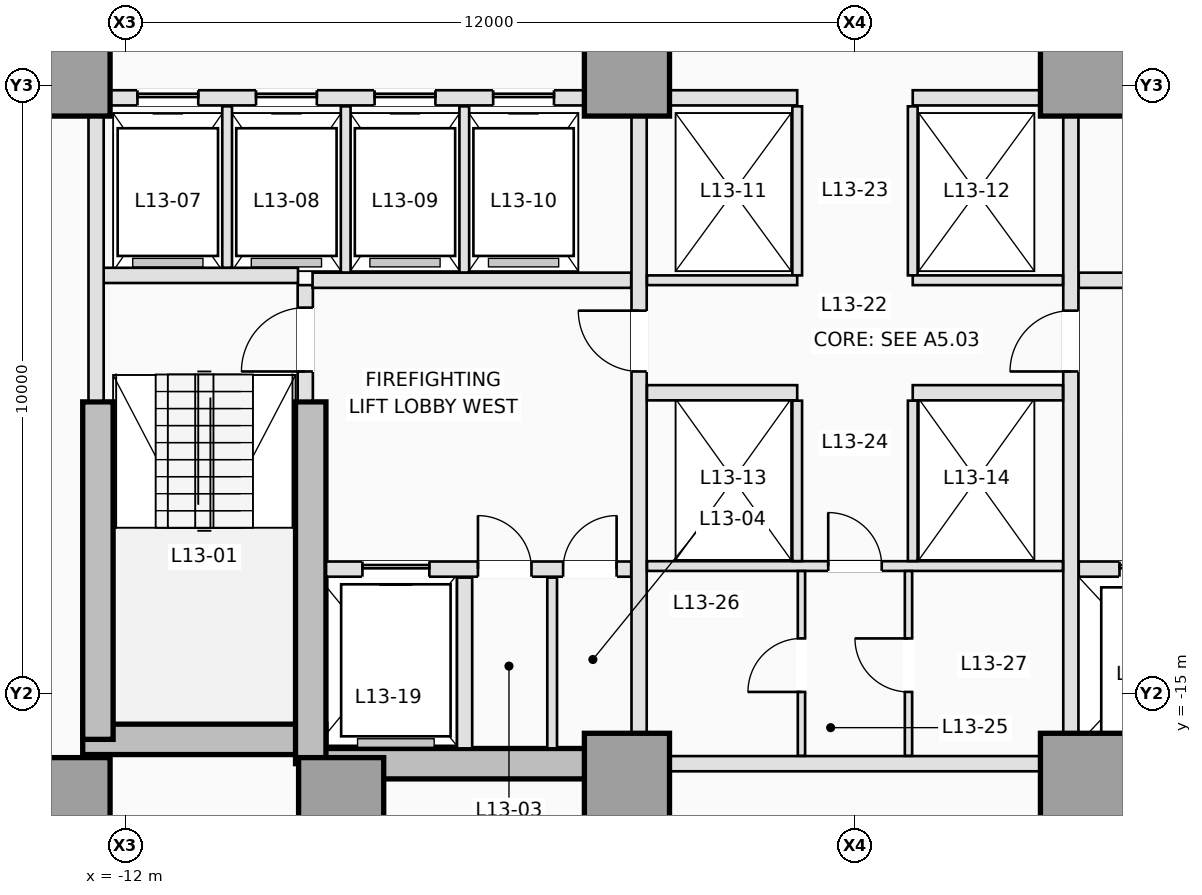
"""IFC4 building model, lengths in metres.
Left out: names, types, materials, properties, quantities, classifications, styles, units other than length and angle.
Written with IfcOpenShell. Run it as: python <this file> out.ifc"""

import sys

from ifc_helpers import new_model, si_unit, direction, frame, frame_2d, origin, origin_2d, place, context, subcontext, project, spatial, rectangle, extrude, element, fill, save


model = new_model("IFC4")
c1 = context("Model", 3, precision=1e-05, world=origin(), true_north=direction((0.0, 1.0)))
c2 = subcontext(c1, "Body", "Model", "MODEL_VIEW")
j1 = project(units=[si_unit("LENGTHUNIT", "METRE"), si_unit("PLANEANGLEUNIT", "RADIAN")], contexts=[c1])
p1 = place(None, origin())
s1 = spatial("IfcSite", under=j1, at=p1, CompositionType="ELEMENT")
p2 = place(p1, origin())
s2 = spatial("IfcBuilding", under=s1, at=p2, CompositionType="ELEMENT")
p3 = place(p2, frame((0.0, 0.0, 52.1)))
s3 = spatial("IfcBuildingStorey", under=s2, at=p3, CompositionType="ELEMENT", Elevation=52.1)
p4 = place(p3, frame((-12.7, -15.75, 0.0), z_axis=(0.0, 0.0, 1.0), x_axis=(1.0, 0.0, 0.0)))
e1 = element("IfcWall", 1, at=p4, inside=s3, PredefinedType="SHEAR", context=c2, shape_type="SweptSolid", body=[
    extrude(rectangle(XDim=4.0, YDim=0.5, at=frame_2d((2.0, 0.0))), origin(), (0.0, 0.0, 1.0), 3.5),
])
for number, where, z_axis, x_axis in (
    (2, (-8.95, -16.15, 0.0), (0.0, 0.0, 1.0), (1.0, 0.0, 0.0)),
    (3, (3.75, -16.15, 0.0), (0.0, 0.0, 1.0), (1.0, 0.0, 0.0)),
):
    element("IfcWall", number, at=place(p3, frame(where, z_axis=z_axis, x_axis=x_axis)), inside=s3, PredefinedType="SHEAR", context=c2, shape_type="SweptSolid", body=[
        extrude(rectangle(XDim=5.2, YDim=0.5, at=frame_2d((2.6, 0.0))), origin(), (0.0, 0.0, 1.0), 3.5),
    ])
p5 = place(p3, frame((-12.45, -15.75, 0.0), z_axis=(0.0, 0.0, 1.0), x_axis=(0.0, 1.0, 0.0)))
e4 = element("IfcWall", 4, at=p5, inside=s3, PredefinedType="SHEAR", context=c2, shape_type="SweptSolid", body=[
    extrude(rectangle(XDim=5.55, YDim=0.5, at=frame_2d((2.775, 0.0))), origin(), (0.0, 0.0, 1.0), 3.5),
])
p6 = place(p3, frame((-8.95, -16.15, 0.0), z_axis=(0.0, 0.0, 1.0), x_axis=(0.0, 1.0, 0.0)))
e5 = element("IfcWall", 5, at=p6, inside=s3, PredefinedType="SHEAR", context=c2, shape_type="SweptSolid", body=[
    extrude(rectangle(XDim=5.95, YDim=0.5, at=frame_2d((2.975, 0.0))), origin(), (0.0, 0.0, 1.0), 3.5),
])
for number, where, z_axis, x_axis in (
    (6, (-12.95, -16.75, 0.0), (0.0, 0.0, 1.0), (1.0, 0.0, 0.0)),
    (7, (-8.45, -16.75, 0.0), (0.0, 0.0, 1.0), (1.0, 0.0, 0.0)),
    (8, (-3.75, -16.35, 0.0), (0.0, 0.0, 1.0), (1.0, 0.0, 0.0)),
    (9, (3.75, -16.35, 0.0), (0.0, 0.0, 1.0), (1.0, 0.0, 0.0)),
    (10, (-12.95, -4.8, 0.0), (0.0, 0.0, 1.0), (1.0, 0.0, 0.0)),
    (11, (-3.75, -4.8, 0.0), (0.0, 0.0, 1.0), (1.0, 0.0, 0.0)),
    (12, (3.75, -4.8, 0.0), (0.0, 0.0, 1.0), (1.0, 0.0, 0.0)),
):
    element("IfcColumn", number, at=place(p3, frame(where, z_axis=z_axis, x_axis=x_axis)), inside=s3, PredefinedType="COLUMN", context=c2, shape_type="SweptSolid", body=[
        extrude(rectangle(XDim=1.4, YDim=1.4, at=origin_2d()), origin(), (0.0, 0.0, 1.0), 3.5),
    ])
p7 = place(p3, frame((-9.04, -10.18, 0.0), z_axis=(0.0, 0.0, 1.0), x_axis=(0.0, 1.0, 0.0)))
e13 = element("IfcWall", 13, at=p7, inside=s3, PredefinedType="PARTITIONING", context=c2, shape_type="SweptSolid", body=[
    extrude(rectangle(XDim=1.9, YDim=0.25, at=frame_2d((0.95, 0.0))), origin(), (0.0, 0.0, 1.0), 3.25),
])
p8 = place(p7, frame((0.48, 0.0, 0.0)))
e14 = element("IfcOpeningElement", 14, at=p8, cuts=e13, PredefinedType="OPENING", context=c2, shape_type="SweptSolid", body=[
    extrude(rectangle(XDim=1.05, YDim=2.15, at=frame_2d((0.525, 1.075))), frame((0.0, 0.135, 0.0), z_axis=(0.0, -1.0, 0.0), x_axis=(1.0, 0.0, 0.0)), (0.0, 0.0, 1.0), 0.27),
])
p9 = place(p3, frame((-12.38, -8.12, 0.0), z_axis=(0.0, 0.0, 1.0), x_axis=(1.0, 0.0, 0.0)))
e15 = element("IfcWall", 15, at=p9, inside=s3, PredefinedType="PARTITIONING", context=c2, shape_type="SweptSolid", body=[
    extrude(rectangle(XDim=3.22, YDim=0.25, at=frame_2d((1.61, 0.0))), origin(), (0.0, 0.0, 1.0), 3.25),
])
p10 = place(p3, frame((-12.48, -10.18, 0.0), z_axis=(0.0, 0.0, 1.0), x_axis=(0.0, 1.0, 0.0)))
e16 = element("IfcWall", 16, at=p10, inside=s3, PredefinedType="PARTITIONING", context=c2, shape_type="SweptSolid", body=[
    extrude(rectangle(XDim=4.678, YDim=0.25, at=frame_2d((2.339, 0.0))), origin(), (0.0, 0.0, 1.0), 3.25),
])
p11 = place(p3, frame((-8.698, -12.95, 0.0), z_axis=(0.0, 0.0, 1.0), x_axis=(1.0, 0.0, 0.0)))
e17 = element("IfcWall", 17, at=p11, inside=s3, PredefinedType="PARTITIONING", context=c2, shape_type="SweptSolid", body=[
    extrude(rectangle(XDim=5.018, YDim=0.25, at=frame_2d((2.509, 0.0))), origin(), (0.0, 0.0, 1.0), 3.25),
])
p12 = place(p11, frame((0.598, 0.0, 0.0)))
e18 = element("IfcOpeningElement", 18, at=p12, cuts=e17, PredefinedType="OPENING", context=c2, shape_type="SweptSolid", body=[
    extrude(rectangle(XDim=1.1, YDim=2.15, at=frame_2d((0.55, 1.075))), frame((0.0, 0.135, 0.0), z_axis=(0.0, -1.0, 0.0), x_axis=(1.0, 0.0, 0.0)), (0.0, 0.0, 1.0), 0.27),
])
p13 = place(p11, frame((2.498, 0.0, 0.0)))
e19 = element("IfcOpeningElement", 19, at=p13, cuts=e17, PredefinedType="OPENING", context=c2, shape_type="SweptSolid", body=[
    extrude(rectangle(XDim=0.88, YDim=2.1, at=frame_2d((0.44, 1.05))), frame((0.0, 0.135, 0.0), z_axis=(0.0, -1.0, 0.0), x_axis=(1.0, 0.0, 0.0)), (0.0, 0.0, 1.0), 0.27),
])
p14 = place(p11, frame((3.898, 0.0, 0.0)))
e20 = element("IfcOpeningElement", 20, at=p14, cuts=e17, PredefinedType="OPENING", context=c2, shape_type="SweptSolid", body=[
    extrude(rectangle(XDim=0.88, YDim=2.1, at=frame_2d((0.44, 1.05))), frame((0.0, 0.135, 0.0), z_axis=(0.0, -1.0, 0.0), x_axis=(1.0, 0.0, 0.0)), (0.0, 0.0, 1.0), 0.27),
])
p15 = place(p3, frame((3.68, -12.95, 0.0), z_axis=(0.0, 0.0, 1.0), x_axis=(1.0, 0.0, 0.0)))
e21 = element("IfcWall", 21, at=p15, inside=s3, PredefinedType="PARTITIONING", context=c2, shape_type="SweptSolid", body=[
    extrude(rectangle(XDim=5.018, YDim=0.25, at=frame_2d((2.509, 0.0))), origin(), (0.0, 0.0, 1.0), 3.25),
])
p16 = place(p15, frame((3.32, 0.0, 0.0)))
e22 = element("IfcOpeningElement", 22, at=p16, cuts=e21, PredefinedType="OPENING", context=c2, shape_type="SweptSolid", body=[
    extrude(rectangle(XDim=1.1, YDim=2.15, at=frame_2d((0.55, 1.075))), frame((0.0, 0.135, 0.0), z_axis=(0.0, -1.0, 0.0), x_axis=(1.0, 0.0, 0.0)), (0.0, 0.0, 1.0), 0.27),
])
p17 = place(p15, frame((0.67, 0.0, 0.0)))
e23 = element("IfcOpeningElement", 23, at=p17, cuts=e21, PredefinedType="OPENING", context=c2, shape_type="SweptSolid", body=[
    extrude(rectangle(XDim=1.2, YDim=2.15, at=frame_2d((0.6, 1.075))), frame((0.0, 0.135, 0.0), z_axis=(0.0, -1.0, 0.0), x_axis=(1.0, 0.0, 0.0)), (0.0, 0.0, 1.0), 0.27),
])
p18 = place(p3, frame((-6.42, -15.898, 0.0), z_axis=(0.0, 0.0, 1.0), x_axis=(0.0, 1.0, 0.0)))
e24 = element("IfcWall", 24, at=p18, inside=s3, PredefinedType="PARTITIONING", context=c2, shape_type="SweptSolid", body=[
    extrude(rectangle(XDim=2.808, YDim=0.25, at=frame_2d((1.404, 0.0))), origin(), (0.0, 0.0, 1.0), 3.25),
])
p19 = place(p3, frame((-4.98, -15.898, 0.0), z_axis=(0.0, 0.0, 1.0), x_axis=(0.0, 1.0, 0.0)))
e25 = element("IfcWall", 25, at=p19, inside=s3, PredefinedType="PARTITIONING", context=c2, shape_type="SweptSolid", body=[
    extrude(rectangle(XDim=2.808, YDim=0.16, at=frame_2d((1.404, 0.0))), origin(), (0.0, 0.0, 1.0), 3.25),
])
for number, where, z_axis, x_axis in (
    (26, (-8.92, -8.2, 0.0), (0.0, 0.0, 1.0), (1.0, 0.0, 0.0)),
    (27, (3.68, -8.2, 0.0), (0.0, 0.0, 1.0), (1.0, 0.0, 0.0)),
):
    element("IfcWall", number, at=place(p3, frame(where, z_axis=z_axis, x_axis=x_axis)), inside=s3, PredefinedType="PARTITIONING", context=c2, shape_type="SweptSolid", body=[
        extrude(rectangle(XDim=5.24, YDim=0.25, at=frame_2d((2.62, 0.0))), origin(), (0.0, 0.0, 1.0), 3.25),
    ])
p20 = place(p3, frame((-3.55, -15.648, 0.0), z_axis=(0.0, 0.0, 1.0), x_axis=(0.0, 1.0, 0.0)))
e28 = element("IfcWall", 28, at=p20, inside=s3, PredefinedType="PARTITIONING", context=c2, shape_type="SweptSolid", body=[
    extrude(rectangle(XDim=10.146, YDim=0.25, at=frame_2d((5.073, 0.0))), origin(), (0.0, 0.0, 1.0), 3.25),
])
p21 = place(p20, frame((5.948, 0.0, 0.0)))
e29 = element("IfcOpeningElement", 29, at=p21, cuts=e28, PredefinedType="OPENING", context=c2, shape_type="SweptSolid", body=[
    extrude(rectangle(XDim=1.0, YDim=2.15, at=frame_2d((0.5, 1.075))), frame((0.0, 0.135, 0.0), z_axis=(0.0, -1.0, 0.0), x_axis=(1.0, 0.0, 0.0)), (0.0, 0.0, 1.0), 0.27),
])
p22 = place(p3, frame((3.55, -15.648, 0.0), z_axis=(0.0, 0.0, 1.0), x_axis=(0.0, 1.0, 0.0)))
e30 = element("IfcWall", 30, at=p22, inside=s3, PredefinedType="PARTITIONING", context=c2, shape_type="SweptSolid", body=[
    extrude(rectangle(XDim=10.146, YDim=0.25, at=frame_2d((5.073, 0.0))), origin(), (0.0, 0.0, 1.0), 3.25),
])
p23 = place(p22, frame((5.948, 0.0, 0.0)))
e31 = element("IfcOpeningElement", 31, at=p23, cuts=e30, PredefinedType="OPENING", context=c2, shape_type="SweptSolid", body=[
    extrude(rectangle(XDim=1.0, YDim=2.15, at=frame_2d((0.5, 1.075))), frame((0.0, 0.135, 0.0), z_axis=(0.0, -1.0, 0.0), x_axis=(1.0, 0.0, 0.0)), (0.0, 0.0, 1.0), 0.27),
])
p24 = place(p3, frame((-12.248, -5.2, 0.0), z_axis=(0.0, 0.0, 1.0), x_axis=(1.0, 0.0, 0.0)))
e32 = element("IfcWall", 32, at=p24, inside=s3, PredefinedType="PARTITIONING", context=c2, shape_type="SweptSolid", body=[
    extrude(rectangle(XDim=7.796, YDim=0.25, at=frame_2d((3.898, 0.0))), origin(), (0.0, 0.0, 1.0), 3.25),
])
p25 = place(p24, frame((0.448, 0.0, 0.0)))
e33 = element("IfcOpeningElement", 33, at=p25, cuts=e32, PredefinedType="OPENING", context=c2, shape_type="SweptSolid", body=[
    extrude(rectangle(XDim=1.0, YDim=2.15, at=frame_2d((0.5, 1.075))), frame((0.0, 0.135, 0.0), z_axis=(0.0, -1.0, 0.0), x_axis=(1.0, 0.0, 0.0)), (0.0, 0.0, 1.0), 0.27),
])
p26 = place(p24, frame((2.398, 0.0, 0.0)))
e34 = element("IfcOpeningElement", 34, at=p26, cuts=e32, PredefinedType="OPENING", context=c2, shape_type="SweptSolid", body=[
    extrude(rectangle(XDim=1.0, YDim=2.15, at=frame_2d((0.5, 1.075))), frame((0.0, 0.135, 0.0), z_axis=(0.0, -1.0, 0.0), x_axis=(1.0, 0.0, 0.0)), (0.0, 0.0, 1.0), 0.27),
])
p27 = place(p24, frame((4.348, 0.0, 0.0)))
e35 = element("IfcOpeningElement", 35, at=p27, cuts=e32, PredefinedType="OPENING", context=c2, shape_type="SweptSolid", body=[
    extrude(rectangle(XDim=1.0, YDim=2.15, at=frame_2d((0.5, 1.075))), frame((0.0, 0.135, 0.0), z_axis=(0.0, -1.0, 0.0), x_axis=(1.0, 0.0, 0.0)), (0.0, 0.0, 1.0), 0.27),
])
p28 = place(p24, frame((6.298, 0.0, 0.0)))
e36 = element("IfcOpeningElement", 36, at=p28, cuts=e32, PredefinedType="OPENING", context=c2, shape_type="SweptSolid", body=[
    extrude(rectangle(XDim=1.0, YDim=2.15, at=frame_2d((0.5, 1.075))), frame((0.0, 0.135, 0.0), z_axis=(0.0, -1.0, 0.0), x_axis=(1.0, 0.0, 0.0)), (0.0, 0.0, 1.0), 0.27),
])
for number, where, z_axis, x_axis in (
    (37, (-3.048, -5.2, 0.0), (0.0, 0.0, 1.0), (1.0, 0.0, 0.0)),
    (38, (0.95, -5.2, 0.0), (0.0, 0.0, 1.0), (1.0, 0.0, 0.0)),
):
    element("IfcWall", number, at=place(p3, frame(where, z_axis=z_axis, x_axis=x_axis)), inside=s3, PredefinedType="PARTITIONING", context=c2, shape_type="SweptSolid", body=[
        extrude(rectangle(XDim=2.098, YDim=0.25, at=frame_2d((1.049, 0.0))), origin(), (0.0, 0.0, 1.0), 3.25),
    ])
p29 = place(p3, frame((-10.325, -7.993, 0.0), z_axis=(0.0, 0.0, 1.0), x_axis=(0.0, 1.0, 0.0)))
e39 = element("IfcWall", 39, at=p29, inside=s3, PredefinedType="PARTITIONING", context=c2, shape_type="SweptSolid", body=[
    extrude(rectangle(XDim=2.653, YDim=0.16, at=frame_2d((1.326, 0.0))), origin(), (0.0, 0.0, 1.0), 3.25),
])
for number, where, z_axis, x_axis in (
    (40, (-8.375, -8.073, 0.0), (0.0, 0.0, 1.0), (0.0, 1.0, 0.0)),
    (41, (-6.425, -8.073, 0.0), (0.0, 0.0, 1.0), (0.0, 1.0, 0.0)),
):
    element("IfcWall", number, at=place(p3, frame(where, z_axis=z_axis, x_axis=x_axis)), inside=s3, PredefinedType="PARTITIONING", context=c2, shape_type="SweptSolid", body=[
        extrude(rectangle(XDim=2.733, YDim=0.16, at=frame_2d((1.366, 0.0))), origin(), (0.0, 0.0, 1.0), 3.25),
    ])
p30 = place(p3, frame((-3.048, -16.15, 0.0), z_axis=(0.0, 0.0, 1.0), x_axis=(1.0, 0.0, 0.0)))
e42 = element("IfcWall", 42, at=p30, inside=s3, PredefinedType="PARTITIONING", context=c2, shape_type="SweptSolid", body=[
    extrude(rectangle(XDim=6.096, YDim=0.25, at=frame_2d((3.048, 0.0))), origin(), (0.0, 0.0, 1.0), 2.3),
])
for number, where, z_axis, x_axis in (
    (43, (-0.95, -8.12, 0.0), (0.0, 0.0, 1.0), (0.0, 1.0, 0.0)),
    (44, (0.95, -8.12, 0.0), (0.0, 0.0, 1.0), (0.0, 1.0, 0.0)),
):
    element("IfcWall", number, at=place(p3, frame(where, z_axis=z_axis, x_axis=x_axis)), inside=s3, PredefinedType="PARTITIONING", context=c2, shape_type="SweptSolid", body=[
        extrude(rectangle(XDim=2.78, YDim=0.16, at=frame_2d((1.39, 0.0))), origin(), (0.0, 0.0, 1.0), 3.25),
    ])
for number, where, z_axis, x_axis in (
    (45, (-3.42, -8.2, 0.0), (0.0, 0.0, 1.0), (1.0, 0.0, 0.0)),
    (46, (0.95, -8.2, 0.0), (0.0, 0.0, 1.0), (1.0, 0.0, 0.0)),
):
    element("IfcWall", number, at=place(p3, frame(where, z_axis=z_axis, x_axis=x_axis)), inside=s3, PredefinedType="PARTITIONING", context=c2, shape_type="SweptSolid", body=[
        extrude(rectangle(XDim=2.47, YDim=0.16, at=frame_2d((1.235, 0.0))), origin(), (0.0, 0.0, 1.0), 3.25),
    ])
for number, where, z_axis, x_axis in (
    (47, (-3.42, -10.05, 0.0), (0.0, 0.0, 1.0), (1.0, 0.0, 0.0)),
    (48, (0.95, -10.05, 0.0), (0.0, 0.0, 1.0), (1.0, 0.0, 0.0)),
):
    element("IfcWall", number, at=place(p3, frame(where, z_axis=z_axis, x_axis=x_axis)), inside=s3, PredefinedType="PARTITIONING", context=c2, shape_type="SweptSolid", body=[
        extrude(rectangle(XDim=2.47, YDim=0.25, at=frame_2d((1.235, 0.0))), origin(), (0.0, 0.0, 1.0), 3.25),
    ])
p31 = place(p3, frame((-3.42, -12.9, 0.0), z_axis=(0.0, 0.0, 1.0), x_axis=(1.0, 0.0, 0.0)))
e49 = element("IfcWall", 49, at=p31, inside=s3, PredefinedType="PARTITIONING", context=c2, shape_type="SweptSolid", body=[
    extrude(rectangle(XDim=6.84, YDim=0.16, at=frame_2d((3.42, 0.0))), origin(), (0.0, 0.0, 1.0), 3.25),
])
p32 = place(p31, frame((2.98, 0.0, 0.0)))
e50 = element("IfcOpeningElement", 50, at=p32, cuts=e49, PredefinedType="OPENING", context=c2, shape_type="SweptSolid", body=[
    extrude(rectangle(XDim=0.88, YDim=2.12, at=frame_2d((0.44, 1.06))), frame((0.0, 0.09, 0.0), z_axis=(0.0, -1.0, 0.0), x_axis=(1.0, 0.0, 0.0)), (0.0, 0.0, 1.0), 0.18),
])
for number, where, z_axis, x_axis in (
    (51, (-0.95, -12.818, 0.0), (0.0, 0.0, 1.0), (0.0, 1.0, 0.0)),
    (52, (0.95, -12.818, 0.0), (0.0, 0.0, 1.0), (0.0, 1.0, 0.0)),
):
    element("IfcWall", number, at=place(p3, frame(where, z_axis=z_axis, x_axis=x_axis)), inside=s3, PredefinedType="PARTITIONING", context=c2, shape_type="SweptSolid", body=[
        extrude(rectangle(XDim=2.638, YDim=0.16, at=frame_2d((1.319, 0.0))), origin(), (0.0, 0.0, 1.0), 3.25),
    ])
p33 = place(p3, frame((-0.88, -16.02, 0.0), z_axis=(0.0, 0.0, 1.0), x_axis=(0.0, 1.0, 0.0)))
e53 = element("IfcWall", 53, at=p33, inside=s3, PredefinedType="PARTITIONING", context=c2, shape_type="SweptSolid", body=[
    extrude(rectangle(XDim=3.038, YDim=0.12, at=frame_2d((1.519, 0.0))), origin(), (0.0, 0.0, 1.0), 3.25),
])
p34 = place(p33, frame((1.05, 0.0, 0.0)))
e54 = element("IfcOpeningElement", 54, at=p34, cuts=e53, PredefinedType="OPENING", context=c2, shape_type="SweptSolid", body=[
    extrude(rectangle(XDim=0.88, YDim=2.12, at=frame_2d((0.44, 1.06))), frame((0.0, 0.07, 0.0), z_axis=(0.0, -1.0, 0.0), x_axis=(1.0, 0.0, 0.0)), (0.0, 0.0, 1.0), 0.14),
])
p35 = place(p3, frame((0.88, -16.02, 0.0), z_axis=(0.0, 0.0, 1.0), x_axis=(0.0, 1.0, 0.0)))
e55 = element("IfcWall", 55, at=p35, inside=s3, PredefinedType="PARTITIONING", context=c2, shape_type="SweptSolid", body=[
    extrude(rectangle(XDim=3.038, YDim=0.12, at=frame_2d((1.519, 0.0))), origin(), (0.0, 0.0, 1.0), 3.25),
])
p36 = place(p35, frame((1.05, 0.0, 0.0)))
e56 = element("IfcOpeningElement", 56, at=p36, cuts=e55, PredefinedType="OPENING", context=c2, shape_type="SweptSolid", body=[
    extrude(rectangle(XDim=0.88, YDim=2.12, at=frame_2d((0.44, 1.06))), frame((0.0, 0.07, 0.0), z_axis=(0.0, -1.0, 0.0), x_axis=(1.0, 0.0, 0.0)), (0.0, 0.0, 1.0), 0.14),
])
p37 = place(p25, origin())
e57 = element("IfcDoor", 57, at=p37, inside=s3, OperationType="SLIDING_TO_LEFT", PredefinedType="DOOR", context=c2, shape_type="SweptSolid", body=[
    extrude(rectangle(XDim=1.0, YDim=2.15, at=frame_2d((0.5, 1.075))), frame((0.0, 0.025, 0.0), z_axis=(0.0, -1.0, 0.0), x_axis=(1.0, 0.0, 0.0)), (0.0, 0.0, 1.0), 0.05),
])
fill(e33, e57)
p38 = place(p26, origin())
e58 = element("IfcDoor", 58, at=p38, inside=s3, OperationType="SLIDING_TO_LEFT", PredefinedType="DOOR", context=c2, shape_type="SweptSolid", body=[
    extrude(rectangle(XDim=1.0, YDim=2.15, at=frame_2d((0.5, 1.075))), frame((0.0, 0.025, 0.0), z_axis=(0.0, -1.0, 0.0), x_axis=(1.0, 0.0, 0.0)), (0.0, 0.0, 1.0), 0.05),
])
fill(e34, e58)
p39 = place(p27, origin())
e59 = element("IfcDoor", 59, at=p39, inside=s3, OperationType="SLIDING_TO_LEFT", PredefinedType="DOOR", context=c2, shape_type="SweptSolid", body=[
    extrude(rectangle(XDim=1.0, YDim=2.15, at=frame_2d((0.5, 1.075))), frame((0.0, 0.025, 0.0), z_axis=(0.0, -1.0, 0.0), x_axis=(1.0, 0.0, 0.0)), (0.0, 0.0, 1.0), 0.05),
])
fill(e35, e59)
p40 = place(p28, origin())
e60 = element("IfcDoor", 60, at=p40, inside=s3, OperationType="SLIDING_TO_LEFT", PredefinedType="DOOR", context=c2, shape_type="SweptSolid", body=[
    extrude(rectangle(XDim=1.0, YDim=2.15, at=frame_2d((0.5, 1.075))), frame((0.0, 0.025, 0.0), z_axis=(0.0, -1.0, 0.0), x_axis=(1.0, 0.0, 0.0)), (0.0, 0.0, 1.0), 0.05),
])
fill(e36, e60)
p41 = place(p12, origin())
e61 = element("IfcDoor", 61, at=p41, inside=s3, OperationType="SLIDING_TO_LEFT", PredefinedType="DOOR", context=c2, shape_type="SweptSolid", body=[
    extrude(rectangle(XDim=1.1, YDim=2.15, at=frame_2d((0.55, 1.075))), frame((0.0, 0.025, 0.0), z_axis=(0.0, -1.0, 0.0), x_axis=(1.0, 0.0, 0.0)), (0.0, 0.0, 1.0), 0.05),
])
fill(e18, e61)
p42 = place(p17, origin())
e62 = element("IfcDoor", 62, at=p42, inside=s3, OperationType="SLIDING_TO_LEFT", PredefinedType="DOOR", context=c2, shape_type="SweptSolid", body=[
    extrude(rectangle(XDim=1.2, YDim=2.15, at=frame_2d((0.6, 1.075))), frame((0.0, 0.025, 0.0), z_axis=(0.0, -1.0, 0.0), x_axis=(1.0, 0.0, 0.0)), (0.0, 0.0, 1.0), 0.05),
])
fill(e23, e62)
p43 = place(p8, origin())
e63 = element("IfcDoor", 63, at=p43, inside=s3, OperationType="SINGLE_SWING_LEFT", PredefinedType="DOOR", context=c2, shape_type="SweptSolid", body=[
    extrude(rectangle(XDim=1.05, YDim=2.15, at=frame_2d((0.525, 1.075))), frame((0.0, 0.025, 0.0), z_axis=(0.0, -1.0, 0.0), x_axis=(1.0, 0.0, 0.0)), (0.0, 0.0, 1.0), 0.05),
])
fill(e14, e63)
p44 = place(p13, origin())
e64 = element("IfcDoor", 64, at=p44, inside=s3, OperationType="SINGLE_SWING_LEFT", PredefinedType="TRAPDOOR", context=c2, shape_type="SweptSolid", body=[
    extrude(rectangle(XDim=0.88, YDim=2.1, at=frame_2d((0.44, 1.05))), frame((0.0, 0.025, 0.0), z_axis=(0.0, -1.0, 0.0), x_axis=(1.0, 0.0, 0.0)), (0.0, 0.0, 1.0), 0.05),
])
fill(e19, e64)
p45 = place(p14, origin())
e65 = element("IfcDoor", 65, at=p45, inside=s3, OperationType="SINGLE_SWING_RIGHT", PredefinedType="TRAPDOOR", context=c2, shape_type="SweptSolid", body=[
    extrude(rectangle(XDim=0.88, YDim=2.1, at=frame_2d((0.44, 1.05))), frame((0.0, 0.025, 0.0), z_axis=(0.0, -1.0, 0.0), x_axis=(1.0, 0.0, 0.0)), (0.0, 0.0, 1.0), 0.05),
])
fill(e20, e65)
p46 = place(p21, origin())
e66 = element("IfcDoor", 66, at=p46, inside=s3, OperationType="SINGLE_SWING_RIGHT", PredefinedType="DOOR", context=c2, shape_type="SweptSolid", body=[
    extrude(rectangle(XDim=1.0, YDim=2.15, at=frame_2d((0.5, 1.075))), frame((0.0, 0.025, 0.0), z_axis=(0.0, -1.0, 0.0), x_axis=(1.0, 0.0, 0.0)), (0.0, 0.0, 1.0), 0.05),
])
fill(e29, e66)
p47 = place(p23, origin())
e67 = element("IfcDoor", 67, at=p47, inside=s3, OperationType="SINGLE_SWING_LEFT", PredefinedType="DOOR", context=c2, shape_type="SweptSolid", body=[
    extrude(rectangle(XDim=1.0, YDim=2.15, at=frame_2d((0.5, 1.075))), frame((0.0, 0.025, 0.0), z_axis=(0.0, -1.0, 0.0), x_axis=(1.0, 0.0, 0.0)), (0.0, 0.0, 1.0), 0.05),
])
fill(e31, e67)
p48 = place(p32, origin())
e68 = element("IfcDoor", 68, at=p48, inside=s3, OperationType="SINGLE_SWING_LEFT", PredefinedType="DOOR", context=c2, shape_type="SweptSolid", body=[
    extrude(rectangle(XDim=0.88, YDim=2.12, at=frame_2d((0.44, 1.06))), frame((0.0, 0.025, 0.0), z_axis=(0.0, -1.0, 0.0), x_axis=(1.0, 0.0, 0.0)), (0.0, 0.0, 1.0), 0.05),
])
fill(e50, e68)
p49 = place(p34, origin())
e69 = element("IfcDoor", 69, at=p49, inside=s3, OperationType="SINGLE_SWING_LEFT", PredefinedType="DOOR", context=c2, shape_type="SweptSolid", body=[
    extrude(rectangle(XDim=0.88, YDim=2.12, at=frame_2d((0.44, 1.06))), frame((0.0, 0.025, 0.0), z_axis=(0.0, -1.0, 0.0), x_axis=(1.0, 0.0, 0.0)), (0.0, 0.0, 1.0), 0.05),
])
fill(e54, e69)
p50 = place(p36, origin())
e70 = element("IfcDoor", 70, at=p50, inside=s3, OperationType="SINGLE_SWING_RIGHT", PredefinedType="DOOR", context=c2, shape_type="SweptSolid", body=[
    extrude(rectangle(XDim=0.88, YDim=2.12, at=frame_2d((0.44, 1.06))), frame((0.0, 0.025, 0.0), z_axis=(0.0, -1.0, 0.0), x_axis=(1.0, 0.0, 0.0)), (0.0, 0.0, 1.0), 0.05),
])
fill(e56, e70)
save(model, sys.argv[1])
